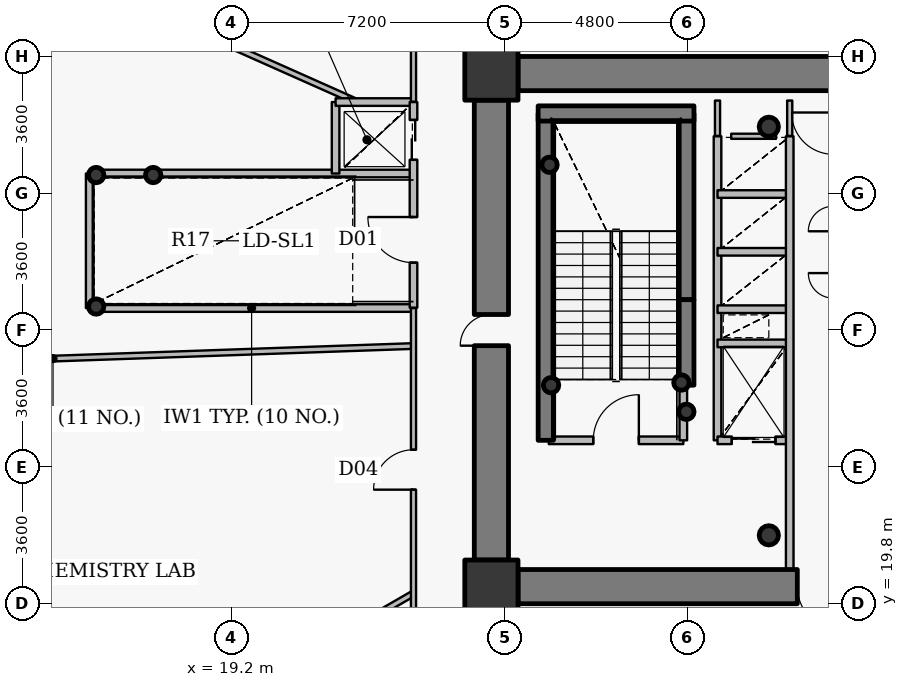
"""IFC4 building model, lengths in metres.
Left out: names, types, materials, properties, quantities, classifications, styles, units other than length and angle.
Written with IfcOpenShell. Run it as: python <this file> out.ifc"""

import sys

from ifc_helpers import new_model, si_unit, direction, frame, frame_2d, origin, origin_2d, place, context, subcontext, project, spatial, rectangle, hollow_circle, extrude, source, transform, mapped, element, fill, save


model = new_model("IFC4")
c1 = context("Model", 3, precision=1e-05, world=origin(), true_north=direction((0.0, 1.0)))
c2 = subcontext(c1, "Body", "Model", "MODEL_VIEW")
j1 = project(units=[si_unit("LENGTHUNIT", "METRE"), si_unit("PLANEANGLEUNIT", "RADIAN")], contexts=[c1])
p1 = place(None, origin())
s1 = spatial("IfcSite", under=j1, at=p1, CompositionType="ELEMENT")
p2 = place(p1, origin())
s2 = spatial("IfcBuilding", under=s1, at=p2, CompositionType="ELEMENT")
p3 = place(p2, frame((0.0, 0.0, 57.6)))
s3 = spatial("IfcBuildingStorey", under=s2, at=p3, CompositionType="ELEMENT", Elevation=57.6)
for number, where, z_axis, x_axis in (
    (1, (26.05, 20.25, 0.0), (0.0, 0.0, 1.0), (1.0, 0.0, 0.0)),
    (2, (26.05, 33.75, 0.0), (0.0, 0.0, 1.0), (1.0, 0.0, 0.0)),
):
    element("IfcColumn", number, at=place(p3, frame(where, z_axis=z_axis, x_axis=x_axis)), inside=s3, PredefinedType="COLUMN", context=c2, shape_type="SweptSolid", body=[
        extrude(rectangle(XDim=1.4, YDim=1.4, at=origin_2d()), origin(), (0.0, 0.0, 1.0), 4.2),
    ])
for number, where, z_axis, x_axis in (
    (3, (33.35, 21.6, 0.0), (0.0, 0.0, 1.0), (1.0, 0.0, 0.0)),
    (4, (33.35, 32.35, 0.0), (0.0, 0.0, 1.0), (1.0, 0.0, 0.0)),
):
    element("IfcColumn", number, at=place(p3, frame(where, z_axis=z_axis, x_axis=x_axis)), inside=s3, PredefinedType="COLUMN", context=c2, shape_type="SweptSolid", body=[
        extrude(hollow_circle(Radius=0.254, WallThickness=0.02, at=origin_2d()), origin(), (0.0, 0.0, 1.0), 4.2),
    ])
p4 = place(p3, frame((27.48, 24.1, 0.0), z_axis=(0.0, 0.0, 1.0), x_axis=(0.0, 1.0, 0.0)))
e5 = element("IfcWall", 5, at=p4, inside=s3, PredefinedType="SHEAR", context=c2, shape_type="SweptSolid", body=[
    extrude(rectangle(XDim=8.6, YDim=0.4, at=frame_2d((4.3, 0.0))), origin(), (0.0, 0.0, 1.0), 4.2),
])
p5 = place(p3, frame((31.18, 27.8, 0.0), z_axis=(0.0, 0.0, 1.0), x_axis=(0.0, 1.0, 0.0)))
e6 = element("IfcWall", 6, at=p5, inside=s3, PredefinedType="SHEAR", context=c2, shape_type="SweptSolid", body=[
    extrude(rectangle(XDim=4.9, YDim=0.4, at=frame_2d((2.45, 0.0))), origin(), (0.0, 0.0, 1.0), 4.2),
])
p6 = place(p3, frame((27.28, 32.7, 0.0), z_axis=(0.0, 0.0, 1.0), x_axis=(1.0, 0.0, 0.0)))
e7 = element("IfcWall", 7, at=p6, inside=s3, PredefinedType="SHEAR", context=c2, shape_type="SweptSolid", body=[
    extrude(rectangle(XDim=4.1, YDim=0.4, at=frame_2d((2.05, 0.0))), origin(), (0.0, 0.0, 1.0), 4.2),
])
for number, where, z_axis, x_axis in (
    (8, (27.58, 31.35, 0.0), (0.0, 0.0, 1.0), (1.0, 0.0, 0.0)),
    (9, (31.05, 25.62, 0.0), (0.0, 0.0, 1.0), (1.0, 0.0, 0.0)),
    (10, (31.18, 24.85, 0.0), (0.0, 0.0, 1.0), (1.0, 0.0, 0.0)),
    (11, (27.62, 25.55, 0.0), (0.0, 0.0, 1.0), (1.0, 0.0, 0.0)),
    (12, (15.65, 27.62, 0.0), (0.0, 0.0, 1.0), (1.0, 0.0, 0.0)),
    (13, (15.65, 31.08, 0.0), (0.0, 0.0, 1.0), (1.0, 0.0, 0.0)),
    (14, (17.15, 31.08, 0.0), (0.0, 0.0, 1.0), (1.0, 0.0, 0.0)),
):
    element("IfcColumn", number, at=place(p3, frame(where, z_axis=z_axis, x_axis=x_axis)), inside=s3, PredefinedType="COLUMN", context=c2, shape_type="SweptSolid", body=[
        extrude(hollow_circle(Radius=0.203, WallThickness=0.016, at=origin_2d()), origin(), (0.0, 0.0, 1.0), 4.2),
    ])
p7 = place(p3, frame((26.75, 33.75, 0.0), z_axis=(0.0, 0.0, 1.0), x_axis=(1.0, 0.0, 0.0)))
e15 = element("IfcWall", 15, at=p7, inside=s3, PredefinedType="SHEAR", context=c2, shape_type="SweptSolid", body=[
    extrude(rectangle(XDim=18.5, YDim=0.9, at=frame_2d((9.25, 0.0))), origin(), (0.0, 0.0, 1.0), 3.4),
])
p8 = place(p3, frame((45.25, 20.25, 0.0), z_axis=(0.0, 0.0, 1.0), x_axis=(-1.0, 0.0, 0.0)))
e16 = element("IfcWall", 16, at=p8, inside=s3, PredefinedType="SHEAR", context=c2, shape_type="SweptSolid", body=[
    extrude(rectangle(XDim=18.5, YDim=0.9, at=frame_2d((9.25, 0.0))), origin(), (0.0, 0.0, 1.0), 3.4),
])
p9 = place(p8, frame((10.0, 0.0, 0.0)))
e17 = element("IfcOpeningElement", 17, at=p9, cuts=e16, PredefinedType="OPENING", context=c2, shape_type="SweptSolid", body=[
    extrude(rectangle(XDim=1.15, YDim=2.15, at=origin_2d()), frame((0.575, 0.46, 1.075), z_axis=(0.0, -1.0, 0.0), x_axis=(1.0, 0.0, 0.0)), (0.0, 0.0, 1.0), 0.92),
])
p10 = place(p3, frame((26.05, 20.95, 0.0), z_axis=(0.0, 0.0, 1.0), x_axis=(0.0, 1.0, 0.0)))
e18 = element("IfcWall", 18, at=p10, inside=s3, PredefinedType="SHEAR", context=c2, shape_type="SweptSolid", body=[
    extrude(rectangle(XDim=12.1, YDim=0.9, at=frame_2d((6.05, 0.0))), origin(), (0.0, 0.0, 1.0), 3.4),
])
p11 = place(p10, frame((5.64, 0.0, 0.0)))
e19 = element("IfcOpeningElement", 19, at=p11, cuts=e18, PredefinedType="OPENING", context=c2, shape_type="SweptSolid", body=[
    extrude(rectangle(XDim=0.82, YDim=2.1, at=origin_2d()), frame((0.41, 0.46, 1.05), z_axis=(0.0, -1.0, 0.0), x_axis=(1.0, 0.0, 0.0)), (0.0, 0.0, 1.0), 0.92),
])
p12 = place(p3, frame((31.18, 25.55, 0.0), z_axis=(0.0, 0.0, 1.0), x_axis=(0.0, 1.0, 0.0)))
e20 = element("IfcWall", 20, at=p12, inside=s3, PredefinedType="SHEAR", context=c2, shape_type="SweptSolid", body=[
    extrude(rectangle(XDim=2.25, YDim=0.4, at=frame_2d((1.125, 0.0))), origin(), (0.0, 0.0, 1.0), 3.55),
])
p13 = place(p3, frame((5.029, 25.918, 0.0), z_axis=(0.0, 0.0, 1.0), x_axis=(0.99939062663, 0.034905234611, 0.0)))
e21 = element("IfcWall", 21, at=p13, inside=s3, PredefinedType="PARTITIONING", context=c2, shape_type="SweptSolid", body=[
    extrude(rectangle(XDim=18.983, YDim=0.15, at=frame_2d((9.491, 0.0))), origin(), (0.0, 0.0, 1.0), 3.335),
])
p14 = place(p3, frame((9.06, 38.995, 0.0), z_axis=(0.0, 0.0, 1.0), x_axis=(0.913544945328, -0.406737793751, 0.0)))
e22 = element("IfcWall", 22, at=p14, inside=s3, PredefinedType="PARTITIONING", context=c2, shape_type="SweptSolid", body=[
    extrude(rectangle(XDim=14.738, YDim=0.15, at=frame_2d((7.369, 0.0))), origin(), (0.0, 0.0, 1.0), 3.335),
])
p15 = place(p14, frame((6.844, 0.0, 0.0)))
e23 = element("IfcOpeningElement", 23, at=p15, cuts=e22, PredefinedType="OPENING", context=c2, shape_type="SweptSolid", body=[
    extrude(rectangle(XDim=1.05, YDim=2.15, at=origin_2d()), frame((0.525, 0.085, 1.075), z_axis=(0.0, -1.0, 0.0), x_axis=(1.0, 0.0, 0.0)), (0.0, 0.0, 1.0), 0.17),
])
p16 = place(p3, frame((11.01, 12.572, 0.0), z_axis=(0.0, 0.0, 1.0), x_axis=(0.86602186862, 0.500006123034, 0.0)))
e24 = element("IfcWall", 24, at=p16, inside=s3, PredefinedType="PARTITIONING", context=c2, shape_type="SweptSolid", body=[
    extrude(rectangle(XDim=14.999, YDim=0.15, at=frame_2d((7.5, 0.0))), origin(), (0.0, 0.0, 1.0), 3.335),
])
p17 = place(p3, frame((15.48, 27.58, 0.0), z_axis=(0.0, 0.0, 1.0), x_axis=(0.0, 1.0, 0.0)))
e25 = element("IfcWall", 25, at=p17, inside=s3, PredefinedType="PARTITIONING", context=c2, shape_type="SweptSolid", body=[
    extrude(rectangle(XDim=3.54, YDim=0.2, at=frame_2d((1.77, 0.0))), origin(), (0.0, 0.0, 1.0), 3.95),
])
for number, where, z_axis, x_axis in (
    (26, (15.48, 27.58, 0.0), (0.0, 0.0, 1.0), (1.0, 0.0, 0.0)),
    (27, (15.48, 31.12, 0.0), (0.0, 0.0, 1.0), (1.0, 0.0, 0.0)),
):
    element("IfcWall", number, at=place(p3, frame(where, z_axis=z_axis, x_axis=x_axis)), inside=s3, PredefinedType="PARTITIONING", context=c2, shape_type="SweptSolid", body=[
        extrude(rectangle(XDim=8.52, YDim=0.2, at=frame_2d((4.26, 0.0))), origin(), (0.0, 0.0, 1.0), 3.95),
    ])
p18 = place(p3, frame((21.95, 31.12, 0.0), z_axis=(0.0, 0.0, 1.0), x_axis=(0.0, 1.0, 0.0)))
e28 = element("IfcWall", 28, at=p18, inside=s3, PredefinedType="PARTITIONING", context=c2, shape_type="SweptSolid", body=[
    extrude(rectangle(XDim=1.88, YDim=0.2, at=frame_2d((0.94, 0.0))), origin(), (0.0, 0.0, 1.0), 3.285),
])
p19 = place(p3, frame((21.95, 33.0, 0.0), z_axis=(0.0, 0.0, 1.0), x_axis=(1.0, 0.0, 0.0)))
e29 = element("IfcWall", 29, at=p19, inside=s3, PredefinedType="PARTITIONING", context=c2, shape_type="SweptSolid", body=[
    extrude(rectangle(XDim=2.05, YDim=0.2, at=frame_2d((1.025, 0.0))), origin(), (0.0, 0.0, 1.0), 3.95),
])
p20 = place(p3, frame((24.0, 14.8, 0.0), z_axis=(0.0, 0.0, 1.0), x_axis=(0.0, 1.0, 0.0)))
e30 = element("IfcWall", 30, at=p20, inside=s3, PredefinedType="PARTITIONING", context=c2, shape_type="SweptSolid", body=[
    extrude(rectangle(XDim=12.78, YDim=0.135, at=frame_2d((6.39, 0.0))), origin(), (0.0, 0.0, 1.0), 3.285),
])
p21 = place(p20, frame((8.001, 0.0, 0.0)))
e31 = element("IfcOpeningElement", 31, at=p21, cuts=e30, PredefinedType="OPENING", context=c2, shape_type="SweptSolid", body=[
    extrude(rectangle(XDim=1.05, YDim=2.15, at=origin_2d()), frame((0.525, 0.078, 1.075), z_axis=(0.0, -1.0, 0.0), x_axis=(1.0, 0.0, 0.0)), (0.0, 0.0, 1.0), 0.155),
])
p22 = place(p20, frame((2.131, 0.0, 0.0)))
e32 = element("IfcOpeningElement", 32, at=p22, cuts=e30, PredefinedType="OPENING", context=c2, shape_type="SweptSolid", body=[
    extrude(rectangle(XDim=1.05, YDim=2.15, at=origin_2d()), frame((0.525, 0.078, 1.075), z_axis=(0.0, -1.0, 0.0), x_axis=(1.0, 0.0, 0.0)), (0.0, 0.0, 1.0), 0.155),
])
p23 = place(p3, frame((24.0, 27.59, 0.0), z_axis=(0.0, 0.0, 1.0), x_axis=(0.0, 1.0, 0.0)))
e33 = element("IfcWall", 33, at=p23, inside=s3, PredefinedType="PARTITIONING", context=c2, shape_type="SweptSolid", body=[
    extrude(rectangle(XDim=5.41, YDim=0.2, at=frame_2d((2.705, 0.0))), origin(), (0.0, 0.0, 1.0), 3.285),
])
p24 = place(p23, frame((1.185, 0.0, 0.0)))
e34 = element("IfcOpeningElement", 34, at=p24, cuts=e33, PredefinedType="OPENING", context=c2, shape_type="SweptSolid", body=[
    extrude(rectangle(XDim=1.2, YDim=2.15, at=origin_2d()), frame((0.6, 0.11, 1.075), z_axis=(0.0, -1.0, 0.0), x_axis=(1.0, 0.0, 0.0)), (0.0, 0.0, 1.0), 0.22),
])
p25 = place(p23, frame((3.89, 0.0, 0.0)))
e35 = element("IfcOpeningElement", 35, at=p25, cuts=e33, PredefinedType="OPENING", context=c2, shape_type="SweptSolid", body=[
    extrude(rectangle(XDim=1.05, YDim=2.15, at=origin_2d()), frame((0.525, 0.11, 1.075), z_axis=(0.0, -1.0, 0.0), x_axis=(1.0, 0.0, 0.0)), (0.0, 0.0, 1.0), 0.22),
])
p26 = place(p3, frame((24.0, 33.01, 0.0), z_axis=(0.0, 0.0, 1.0), x_axis=(0.0, 1.0, 0.0)))
e36 = element("IfcWall", 36, at=p26, inside=s3, PredefinedType="PARTITIONING", context=c2, shape_type="SweptSolid", body=[
    extrude(rectangle(XDim=8.19, YDim=0.135, at=frame_2d((4.095, 0.0))), origin(), (0.0, 0.0, 1.0), 3.285),
])
p27 = place(p26, frame((3.57, 0.0, 0.0)))
e37 = element("IfcOpeningElement", 37, at=p27, cuts=e36, PredefinedType="OPENING", context=c2, shape_type="SweptSolid", body=[
    extrude(rectangle(XDim=1.05, YDim=2.15, at=origin_2d()), frame((0.525, 0.078, 1.075), z_axis=(0.0, -1.0, 0.0), x_axis=(1.0, 0.0, 0.0)), (0.0, 0.0, 1.0), 0.155),
])
p28 = place(p3, frame((27.56, 24.1, 0.0), z_axis=(0.0, 0.0, 1.0), x_axis=(1.0, 0.0, 0.0)))
e38 = element("IfcWall", 38, at=p28, inside=s3, PredefinedType="PARTITIONING", context=c2, shape_type="SweptSolid", body=[
    extrude(rectangle(XDim=3.54, YDim=0.2, at=frame_2d((1.77, 0.0))), origin(), (0.0, 0.0, 1.0), 3.95),
])
p29 = place(p28, frame((1.17, 0.0, 0.0)))
e39 = element("IfcOpeningElement", 39, at=p29, cuts=e38, PredefinedType="OPENING", context=c2, shape_type="SweptSolid", body=[
    extrude(rectangle(XDim=1.2, YDim=2.15, at=origin_2d()), frame((0.6, 0.11, 1.075), z_axis=(0.0, -1.0, 0.0), x_axis=(1.0, 0.0, 0.0)), (0.0, 0.0, 1.0), 0.22),
])
p30 = place(p3, frame((31.1, 24.1, 0.0), z_axis=(0.0, 0.0, 1.0), x_axis=(0.0, 1.0, 0.0)))
e40 = element("IfcWall", 40, at=p30, inside=s3, PredefinedType="PARTITIONING", context=c2, shape_type="SweptSolid", body=[
    extrude(rectangle(XDim=1.44, YDim=0.2, at=frame_2d((0.72, 0.0))), origin(), (0.0, 0.0, 1.0), 3.95),
])
p31 = place(p3, frame((32.0, 24.1, 0.0), z_axis=(0.0, 0.0, 1.0), x_axis=(0.0, 1.0, 0.0)))
e41 = element("IfcWall", 41, at=p31, inside=s3, PredefinedType="PARTITIONING", context=c2, shape_type="SweptSolid", body=[
    extrude(rectangle(XDim=8.0, YDim=0.2, at=frame_2d((4.0, 0.0))), origin(), (0.0, 0.0, 1.0), 3.95),
])
p32 = place(p3, frame((32.0, 24.1, 0.0), z_axis=(0.0, 0.0, 1.0), x_axis=(1.0, 0.0, 0.0)))
e42 = element("IfcWall", 42, at=p32, inside=s3, PredefinedType="PARTITIONING", context=c2, shape_type="SweptSolid", body=[
    extrude(rectangle(XDim=1.9, YDim=0.2, at=frame_2d((0.95, 0.0))), origin(), (0.0, 0.0, 1.0), 3.535),
])
p33 = place(p32, frame((0.375, 0.0, 0.0)))
e43 = element("IfcOpeningElement", 43, at=p33, cuts=e42, PredefinedType="OPENING", context=c2, shape_type="SweptSolid", body=[
    extrude(rectangle(XDim=1.15, YDim=2.15, at=origin_2d()), frame((0.575, 0.11, 1.075), z_axis=(0.0, -1.0, 0.0), x_axis=(1.0, 0.0, 0.0)), (0.0, 0.0, 1.0), 0.22),
])
for number, where, z_axis, x_axis in (
    (44, (32.0, 26.65, 0.0), (0.0, 0.0, 1.0), (1.0, 0.0, 0.0)),
    (45, (32.0, 27.55, 0.0), (0.0, 0.0, 1.0), (1.0, 0.0, 0.0)),
    (46, (32.0, 29.06, 0.0), (0.0, 0.0, 1.0), (1.0, 0.0, 0.0)),
    (47, (32.0, 30.58, 0.0), (0.0, 0.0, 1.0), (1.0, 0.0, 0.0)),
):
    element("IfcWall", number, at=place(p3, frame(where, z_axis=z_axis, x_axis=x_axis)), inside=s3, PredefinedType="PARTITIONING", context=c2, shape_type="SweptSolid", body=[
        extrude(rectangle(XDim=1.9, YDim=0.2, at=frame_2d((0.95, 0.0))), origin(), (0.0, 0.0, 1.0), 3.535),
    ])
p34 = place(p3, frame((33.9, 20.7, 0.0), z_axis=(0.0, 0.0, 1.0), x_axis=(0.0, 1.0, 0.0)))
e48 = element("IfcWall", 48, at=p34, inside=s3, PredefinedType="PARTITIONING", context=c2, shape_type="SweptSolid", body=[
    extrude(rectangle(XDim=11.4, YDim=0.2, at=frame_2d((5.7, 0.0))), origin(), (0.0, 0.0, 1.0), 3.535),
])
p35 = place(p3, frame((32.36, 32.1, 0.0), z_axis=(0.0, 0.0, 1.0), x_axis=(1.0, 0.0, 0.0)))
e49 = element("IfcWall", 49, at=p35, inside=s3, PredefinedType="PARTITIONING", context=c2, shape_type="SweptSolid", body=[
    extrude(rectangle(XDim=1.18, YDim=0.135, at=frame_2d((0.59, 0.0))), origin(), (0.0, 0.0, 1.0), 3.535),
])
p36 = place(p3, frame((32.0, 33.04, 0.0), z_axis=(0.0, 0.0, 1.0), x_axis=(0.0, -1.0, 0.0)))
e50 = element("IfcWall", 50, at=p36, inside=s3, PredefinedType="PARTITIONING", context=c2, shape_type="SweptSolid", body=[
    extrude(rectangle(XDim=0.93, YDim=0.135, at=frame_2d((0.465, 0.0))), origin(), (0.0, 0.0, 1.0), 3.485),
])
p37 = place(p3, frame((33.9, 32.11, 0.0), z_axis=(0.0, 0.0, 1.0), x_axis=(0.0, 1.0, 0.0)))
e51 = element("IfcWall", 51, at=p37, inside=s3, PredefinedType="PARTITIONING", context=c2, shape_type="SweptSolid", body=[
    extrude(rectangle(XDim=0.93, YDim=0.135, at=frame_2d((0.465, 0.0))), origin(), (0.0, 0.0, 1.0), 3.535),
])
p38 = place(p3, frame((25.95, 38.893, 0.0), z_axis=(0.0, 0.0, 1.0), x_axis=(0.0, -1.0, 0.0)))
e52 = element("IfcWall", 52, at=p38, inside=s3, PredefinedType="PARTITIONING", context=c2, shape_type="SweptSolid", body=[
    extrude(rectangle(XDim=4.693, YDim=0.135, at=frame_2d((2.346, 0.0))), origin(), (0.0, 0.0, 1.0), 3.285),
])
for number, where, z_axis, x_axis in (
    (53, (25.6, 34.2, 0.0), (0.0, 0.0, 1.0), (0.0, -1.0, 0.0)),
    (54, (25.6, 20.94, 0.0), (0.0, 0.0, 1.0), (0.0, -1.0, 0.0)),
):
    element("IfcWall", number, at=place(p3, frame(where, z_axis=z_axis, x_axis=x_axis)), inside=s3, PredefinedType="PARTITIONING", context=c2, shape_type="SweptSolid", body=[
        extrude(rectangle(XDim=1.14, YDim=0.135, at=frame_2d((0.57, 0.0))), origin(), (0.0, 0.0, 1.0), 3.95),
    ])
p39 = place(p3, frame((25.907, 19.8, 0.0), z_axis=(0.0, 0.0, 1.0), x_axis=(1.0, 0.0, 0.0)))
e55 = element("IfcWall", 55, at=p39, inside=s3, PredefinedType="PARTITIONING", context=c2, shape_type="SweptSolid", body=[
    extrude(rectangle(XDim=0.833, YDim=0.135, at=frame_2d((0.416, 0.0))), origin(), (0.0, 0.0, 1.0), 3.285),
])
m1 = source(origin(), c2, "Body", "SweptSolid", [
    extrude(rectangle(XDim=0.82, YDim=2.1, at=origin_2d()), frame((0.41, 0.025, 1.05), z_axis=(0.0, -1.0, 0.0), x_axis=(1.0, 0.0, 0.0)), (0.0, 0.0, 1.0), 0.05),
])
p40 = place(p11, origin())
e56 = element("IfcDoor", 56, at=p40, inside=s3, OperationType="SINGLE_SWING_LEFT", PredefinedType="DOOR", context=c2, shape_type="MappedRepresentation", body=[
    mapped(m1, transform((0.0, 0.0, 0.0), x_axis=(1.0, 0.0, 0.0), y_axis=(0.0, 1.0, 0.0), z_axis=(0.0, 0.0, 1.0), scale=1.0)),
])
fill(e19, e56)
m2 = source(origin(), c2, "Body", "SweptSolid", [
    extrude(rectangle(XDim=1.15, YDim=2.15, at=origin_2d()), frame((0.575, 0.025, 1.075), z_axis=(0.0, -1.0, 0.0), x_axis=(1.0, 0.0, 0.0)), (0.0, 0.0, 1.0), 0.05),
])
p41 = place(p9, origin())
e57 = element("IfcDoor", 57, at=p41, inside=s3, OperationType="SINGLE_SWING_LEFT", PredefinedType="DOOR", context=c2, shape_type="MappedRepresentation", body=[
    mapped(m2, transform((0.0, 0.0, 0.0), x_axis=(1.0, 0.0, 0.0), y_axis=(0.0, 1.0, 0.0), z_axis=(0.0, 0.0, 1.0), scale=1.0)),
])
fill(e17, e57)
m3 = source(origin(), c2, "Body", "SweptSolid", [
    extrude(rectangle(XDim=1.2, YDim=2.15, at=origin_2d()), frame((0.6, 0.025, 1.075), z_axis=(0.0, -1.0, 0.0), x_axis=(1.0, 0.0, 0.0)), (0.0, 0.0, 1.0), 0.05),
])
p42 = place(p29, origin())
e58 = element("IfcDoor", 58, at=p42, inside=s3, OperationType="SINGLE_SWING_RIGHT", PredefinedType="DOOR", context=c2, shape_type="MappedRepresentation", body=[
    mapped(m3, transform((0.0, 0.0, 0.0), x_axis=(1.0, 0.0, 0.0), y_axis=(0.0, 1.0, 0.0), z_axis=(0.0, 0.0, 1.0), scale=1.0)),
])
fill(e39, e58)
p43 = place(p24, origin())
e59 = element("IfcDoor", 59, at=p43, inside=s3, OperationType="SINGLE_SWING_RIGHT", PredefinedType="DOOR", context=c2, shape_type="MappedRepresentation", body=[
    mapped(m3, transform((0.0, 0.0, 0.0), x_axis=(1.0, 0.0, 0.0), y_axis=(0.0, 1.0, 0.0), z_axis=(0.0, 0.0, 1.0), scale=1.0)),
])
fill(e34, e59)
m4 = source(origin(), c2, "Body", "SweptSolid", [
    extrude(rectangle(XDim=1.15, YDim=2.15, at=origin_2d()), frame((0.575, 0.025, 1.075), z_axis=(0.0, -1.0, 0.0), x_axis=(1.0, 0.0, 0.0)), (0.0, 0.0, 1.0), 0.05),
])
p44 = place(p33, origin())
e60 = element("IfcDoor", 60, at=p44, inside=s3, OperationType="DOUBLE_DOOR_SLIDING", PredefinedType="USERDEFINED", context=c2, shape_type="MappedRepresentation", body=[
    mapped(m4, transform((0.0, 0.0, 0.0), x_axis=(1.0, 0.0, 0.0), y_axis=(0.0, 1.0, 0.0), z_axis=(0.0, 0.0, 1.0), scale=1.0)),
])
fill(e43, e60)
m5 = source(origin(), c2, "Body", "SweptSolid", [
    extrude(rectangle(XDim=1.05, YDim=2.15, at=origin_2d()), frame((0.525, 0.025, 1.075), z_axis=(0.0, -1.0, 0.0), x_axis=(1.0, 0.0, 0.0)), (0.0, 0.0, 1.0), 0.05),
])
p45 = place(p25, origin())
e61 = element("IfcDoor", 61, at=p45, inside=s3, OperationType="DOUBLE_DOOR_SLIDING", PredefinedType="USERDEFINED", context=c2, shape_type="MappedRepresentation", body=[
    mapped(m5, transform((0.0, 0.0, 0.0), x_axis=(1.0, 0.0, 0.0), y_axis=(0.0, 1.0, 0.0), z_axis=(0.0, 0.0, 1.0), scale=1.0)),
])
fill(e35, e61)
m6 = source(origin(), c2, "Body", "SweptSolid", [
    extrude(rectangle(XDim=1.05, YDim=2.15, at=origin_2d()), frame((0.525, 0.025, 1.075), z_axis=(0.0, -1.0, 0.0), x_axis=(1.0, 0.0, 0.0)), (0.0, 0.0, 1.0), 0.05),
])
p46 = place(p21, origin())
e62 = element("IfcDoor", 62, at=p46, inside=s3, OperationType="SINGLE_SWING_LEFT", PredefinedType="DOOR", context=c2, shape_type="MappedRepresentation", body=[
    mapped(m6, transform((0.0, 0.0, 0.0), x_axis=(1.0, 0.0, 0.0), y_axis=(0.0, 1.0, 0.0), z_axis=(0.0, 0.0, 1.0), scale=1.0)),
])
fill(e31, e62)
save(model, sys.argv[1])
